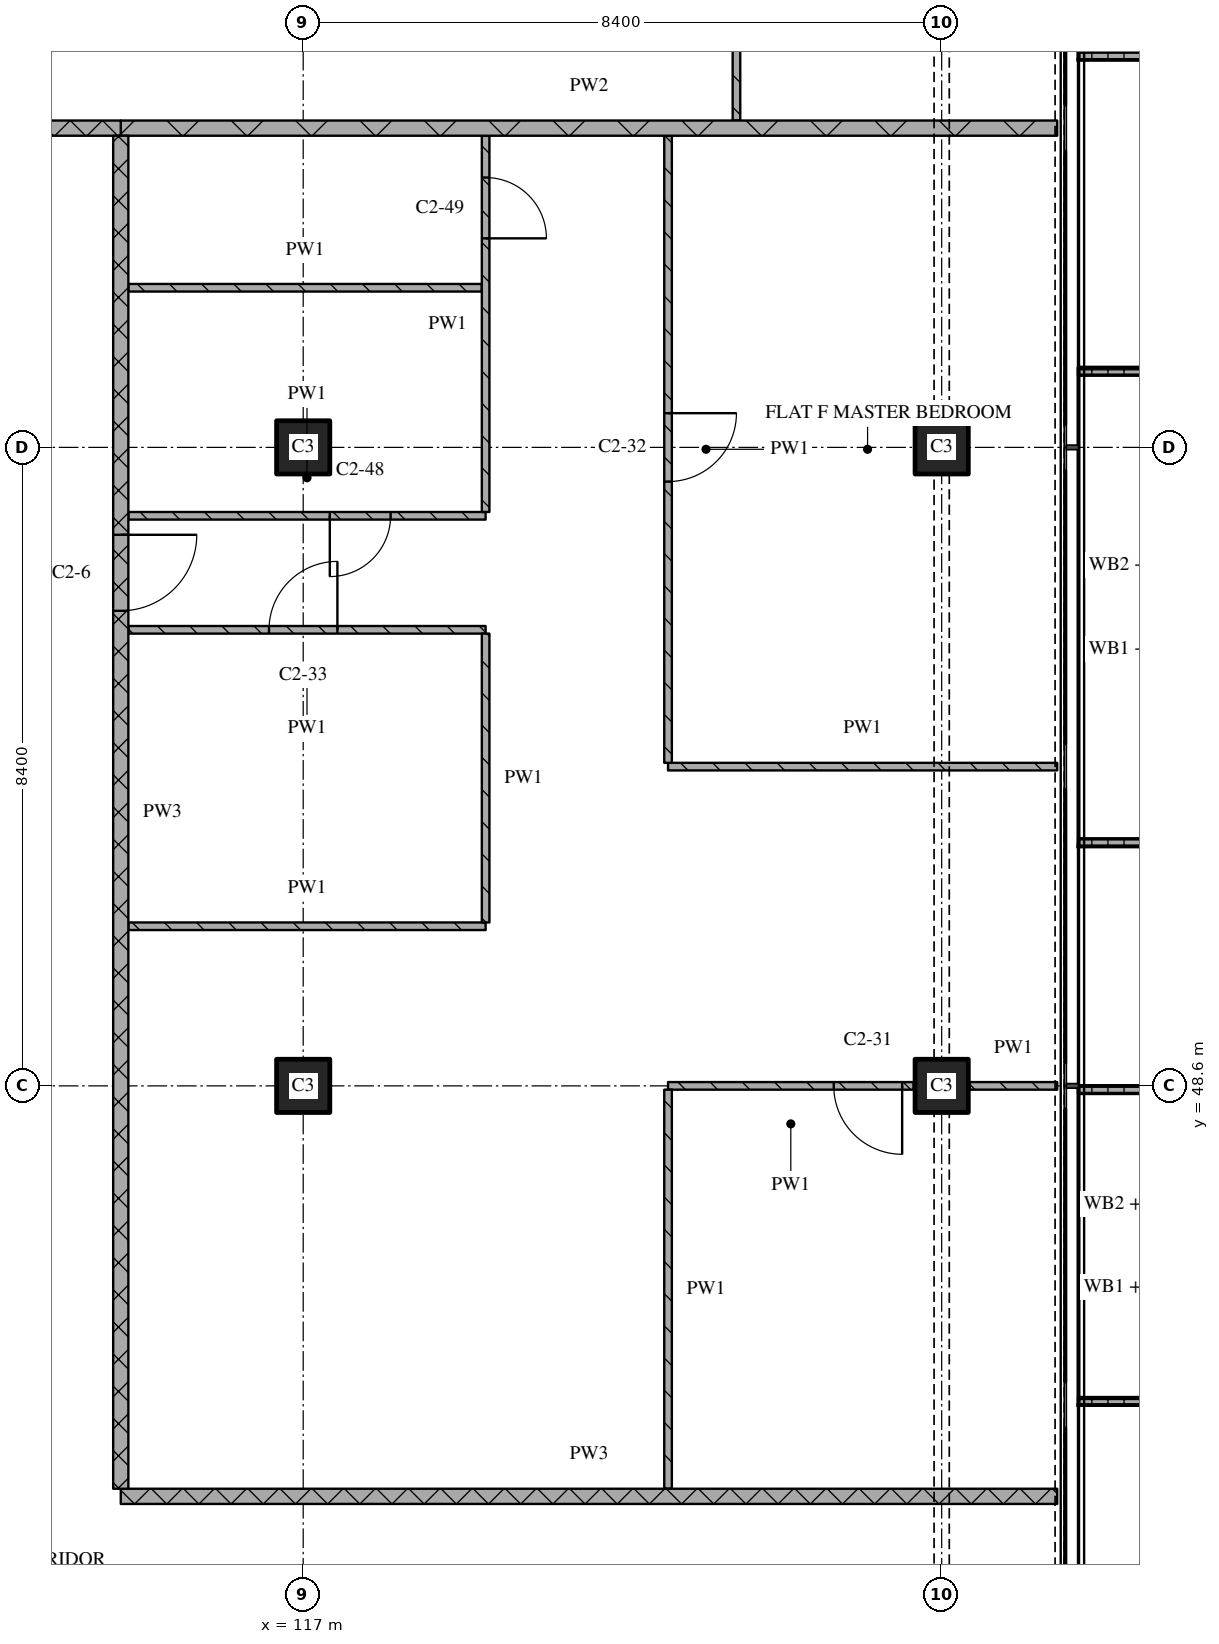
"""IFC4 building model, lengths in metres.
Left out: names, types, materials, properties, quantities, classifications, styles, units other than length and angle.
Written with IfcOpenShell. Run it as: python <this file> out.ifc"""

import sys

from ifc_helpers import new_model, si_unit, direction, frame, frame_2d, origin, origin_2d, place, context, subcontext, project, spatial, polyline, rectangle, outline, extrude, element, fill, save


model = new_model("IFC4")
c1 = context("Model", 3, precision=1e-05, world=origin(), true_north=direction((0.0, 1.0)))
c2 = subcontext(c1, "Body", "Model", "MODEL_VIEW")
j1 = project(units=[si_unit("LENGTHUNIT", "METRE"), si_unit("PLANEANGLEUNIT", "RADIAN")], contexts=[c1])
p1 = place(None, origin())
s1 = spatial("IfcSite", under=j1, at=p1, CompositionType="ELEMENT")
p2 = place(p1, origin())
s2 = spatial("IfcBuilding", under=s1, at=p2, CompositionType="ELEMENT")
p3 = place(p2, frame((0.0, 0.0, 158.25)))
s3 = spatial("IfcBuildingStorey", under=s2, at=p3, CompositionType="ELEMENT", Elevation=158.25)
for number, where, z_axis, x_axis in (
    (1, (117.0, 48.6, 0.0), (0.0, 0.0, 1.0), (1.0, 0.0, 0.0)),
    (2, (117.0, 57.0, 0.0), (0.0, 0.0, 1.0), (1.0, 0.0, 0.0)),
    (3, (125.4, 48.6, 0.0), (0.0, 0.0, 1.0), (1.0, 0.0, 0.0)),
    (4, (125.4, 57.0, 0.0), (0.0, 0.0, 1.0), (1.0, 0.0, 0.0)),
):
    element("IfcColumn", number, at=place(p3, frame(where, z_axis=z_axis, x_axis=x_axis)), inside=s3, PredefinedType="COLUMN", context=c2, shape_type="SweptSolid", body=[
        extrude(rectangle(XDim=0.7, YDim=0.7, at=origin_2d()), origin(), (0.0, 0.0, 1.0), 3.6),
    ])
p4 = place(p3, origin())
e5 = element("IfcWall", 5, at=p4, inside=s3, PredefinedType="SOLIDWALL", context=c2, shape_type="SweptSolid", body=[
    extrude(outline(polyline([(127.2, 44.4), (127.2, 44.5), (128.833, 44.5), (128.833, 48.5), (127.2, 48.5), (127.2, 48.6), (128.933, 48.6), (128.933, 44.4), (127.2, 44.4)])), origin(), (0.0, 0.0, 1.0), 1.0),
])
p5 = place(p3, origin())
e6 = element("IfcWall", 6, at=p5, inside=s3, PredefinedType="SOLIDWALL", context=c2, shape_type="SweptSolid", body=[
    extrude(outline(polyline([(127.2, 51.75), (127.2, 51.85), (128.967, 51.85), (128.967, 57.95), (127.2, 57.95), (127.2, 58.05), (129.067, 58.05), (129.067, 51.75), (127.2, 51.75)])), origin(), (0.0, 0.0, 1.0), 1.0),
])
p6 = place(p3, origin())
e7 = element("IfcWall", 7, at=p6, inside=s3, PredefinedType="SOLIDWALL", context=c2, shape_type="SweptSolid", body=[
    extrude(outline(polyline([(127.2, 62.1), (127.2, 62.2), (128.7, 62.2), (128.7, 64.4), (127.2, 64.4), (127.2, 64.5), (128.8, 64.5), (128.8, 62.1), (127.2, 62.1)])), origin(), (0.0, 0.0, 1.0), 1.0),
])
p7 = place(p3, frame((114.6, 43.2, 0.0), z_axis=(0.0, 0.0, 1.0), x_axis=(1.0, 0.0, 0.0)))
e8 = element("IfcWall", 8, at=p7, inside=s3, PredefinedType="PARTITIONING", context=c2, shape_type="SweptSolid", body=[
    extrude(rectangle(XDim=12.32, YDim=0.2, at=frame_2d((6.16, 0.0))), origin(), (0.0, 0.0, 1.0), 3.32),
])
p8 = place(p3, frame((125.03, 48.6, 0.0), z_axis=(0.0, 0.0, 1.0), x_axis=(-1.0, 0.0, 0.0)))
e9 = element("IfcWall", 9, at=p8, inside=s3, PredefinedType="PARTITIONING", context=c2, shape_type="SweptSolid", body=[
    extrude(rectangle(XDim=3.23, YDim=0.1, at=frame_2d((1.615, 0.0))), origin(), (0.0, 0.0, 1.0), 3.32),
])
p9 = place(p8, frame((0.15, 0.0, 0.0)))
e10 = element("IfcOpeningElement", 10, at=p9, cuts=e9, PredefinedType="OPENING", context=c2, shape_type="SweptSolid", body=[
    extrude(rectangle(XDim=0.9, YDim=2.1, at=frame_2d((0.45, 1.05))), frame((0.0, 0.06, 0.0), z_axis=(0.0, -1.0, 0.0), x_axis=(1.0, 0.0, 0.0)), (0.0, 0.0, 1.0), 0.12),
])
p10 = place(p3, frame((125.77, 48.6, 0.0), z_axis=(0.0, 0.0, 1.0), x_axis=(1.0, 0.0, 0.0)))
e11 = element("IfcWall", 11, at=p10, inside=s3, PredefinedType="PARTITIONING", context=c2, shape_type="SweptSolid", body=[
    extrude(rectangle(XDim=1.15, YDim=0.1, at=frame_2d((0.575, 0.0))), origin(), (0.0, 0.0, 1.0), 3.32),
])
p11 = place(p3, frame((114.7, 50.7, 0.0), z_axis=(0.0, 0.0, 1.0), x_axis=(1.0, 0.0, 0.0)))
e12 = element("IfcWall", 12, at=p11, inside=s3, PredefinedType="PARTITIONING", context=c2, shape_type="SweptSolid", body=[
    extrude(rectangle(XDim=4.7, YDim=0.1, at=frame_2d((2.35, 0.0))), origin(), (0.0, 0.0, 1.0), 3.32),
])
p12 = place(p3, frame((121.8, 52.8, 0.0), z_axis=(0.0, 0.0, 1.0), x_axis=(1.0, 0.0, 0.0)))
e13 = element("IfcWall", 13, at=p12, inside=s3, PredefinedType="PARTITIONING", context=c2, shape_type="SweptSolid", body=[
    extrude(rectangle(XDim=5.12, YDim=0.1, at=frame_2d((2.56, 0.0))), origin(), (0.0, 0.0, 1.0), 3.32),
])
p13 = place(p3, frame((119.4, 54.6, 0.0), z_axis=(0.0, 0.0, 1.0), x_axis=(-1.0, 0.0, 0.0)))
e14 = element("IfcWall", 14, at=p13, inside=s3, PredefinedType="PARTITIONING", context=c2, shape_type="SweptSolid", body=[
    extrude(rectangle(XDim=4.7, YDim=0.1, at=frame_2d((2.35, 0.0))), origin(), (0.0, 0.0, 1.0), 3.32),
])
p14 = place(p13, frame((1.95, 0.0, 0.0)))
e15 = element("IfcOpeningElement", 15, at=p14, cuts=e14, PredefinedType="OPENING", context=c2, shape_type="SweptSolid", body=[
    extrude(rectangle(XDim=0.9, YDim=2.1, at=frame_2d((0.45, 1.05))), frame((0.0, 0.06, 0.0), z_axis=(0.0, -1.0, 0.0), x_axis=(1.0, 0.0, 0.0)), (0.0, 0.0, 1.0), 0.12),
])
p15 = place(p3, frame((114.7, 56.1, 0.0), z_axis=(0.0, 0.0, 1.0), x_axis=(1.0, 0.0, 0.0)))
e16 = element("IfcWall", 16, at=p15, inside=s3, PredefinedType="PARTITIONING", context=c2, shape_type="SweptSolid", body=[
    extrude(rectangle(XDim=4.7, YDim=0.1, at=frame_2d((2.35, 0.0))), origin(), (0.0, 0.0, 1.0), 3.32),
])
p16 = place(p15, frame((2.65, 0.0, 0.0)))
e17 = element("IfcOpeningElement", 17, at=p16, cuts=e16, PredefinedType="OPENING", context=c2, shape_type="SweptSolid", body=[
    extrude(rectangle(XDim=0.8, YDim=2.1, at=frame_2d((0.4, 1.05))), frame((0.0, 0.06, 0.0), z_axis=(0.0, -1.0, 0.0), x_axis=(1.0, 0.0, 0.0)), (0.0, 0.0, 1.0), 0.12),
])
p17 = place(p3, frame((114.7, 59.1, 0.0), z_axis=(0.0, 0.0, 1.0), x_axis=(1.0, 0.0, 0.0)))
e18 = element("IfcWall", 18, at=p17, inside=s3, PredefinedType="PARTITIONING", context=c2, shape_type="SweptSolid", body=[
    extrude(rectangle(XDim=4.65, YDim=0.1, at=frame_2d((2.325, 0.0))), origin(), (0.0, 0.0, 1.0), 3.32),
])
p18 = place(p3, frame((111.0, 61.2, 0.0), z_axis=(0.0, 0.0, 1.0), x_axis=(1.0, 0.0, 0.0)))
e19 = element("IfcWall", 19, at=p18, inside=s3, PredefinedType="PARTITIONING", context=c2, shape_type="SweptSolid", body=[
    extrude(rectangle(XDim=3.6, YDim=0.2, at=frame_2d((1.8, 0.0))), origin(), (0.0, 0.0, 1.0), 3.32),
])
p19 = place(p3, frame((114.6, 61.2, 0.0), z_axis=(0.0, 0.0, 1.0), x_axis=(1.0, 0.0, 0.0)))
e20 = element("IfcWall", 20, at=p19, inside=s3, PredefinedType="PARTITIONING", context=c2, shape_type="SweptSolid", body=[
    extrude(rectangle(XDim=12.32, YDim=0.2, at=frame_2d((6.16, 0.0))), origin(), (0.0, 0.0, 1.0), 3.32),
])
p20 = place(p3, frame((114.6, 61.1, 0.0), z_axis=(0.0, 0.0, 1.0), x_axis=(0.0, -1.0, 0.0)))
e21 = element("IfcWall", 21, at=p20, inside=s3, PredefinedType="PARTITIONING", context=c2, shape_type="SweptSolid", body=[
    extrude(rectangle(XDim=17.8, YDim=0.2, at=frame_2d((8.9, 0.0))), origin(), (0.0, 0.0, 1.0), 3.32),
])
p21 = place(p20, frame((5.25, 0.0, 0.0)))
e22 = element("IfcOpeningElement", 22, at=p21, cuts=e21, PredefinedType="OPENING", context=c2, shape_type="SweptSolid", body=[
    extrude(rectangle(XDim=1.0, YDim=2.1, at=frame_2d((0.5, 1.05))), frame((0.0, 0.11, 0.0), z_axis=(0.0, -1.0, 0.0), x_axis=(1.0, 0.0, 0.0)), (0.0, 0.0, 1.0), 0.22),
])
p22 = place(p3, frame((119.4, 54.55, 0.0), z_axis=(0.0, 0.0, 1.0), x_axis=(0.0, -1.0, 0.0)))
e23 = element("IfcWall", 23, at=p22, inside=s3, PredefinedType="PARTITIONING", context=c2, shape_type="SweptSolid", body=[
    extrude(rectangle(XDim=3.8, YDim=0.1, at=frame_2d((1.9, 0.0))), origin(), (0.0, 0.0, 1.0), 3.32),
])
p23 = place(p3, frame((119.4, 56.15, 0.0), z_axis=(0.0, 0.0, 1.0), x_axis=(0.0, 1.0, 0.0)))
e24 = element("IfcWall", 24, at=p23, inside=s3, PredefinedType="PARTITIONING", context=c2, shape_type="SweptSolid", body=[
    extrude(rectangle(XDim=4.95, YDim=0.1, at=frame_2d((2.475, 0.0))), origin(), (0.0, 0.0, 1.0), 3.32),
])
p24 = place(p23, frame((3.6, 0.0, 0.0)))
e25 = element("IfcOpeningElement", 25, at=p24, cuts=e24, PredefinedType="OPENING", context=c2, shape_type="SweptSolid", body=[
    extrude(rectangle(XDim=0.8, YDim=2.1, at=frame_2d((0.4, 1.05))), frame((0.0, 0.06, 0.0), z_axis=(0.0, -1.0, 0.0), x_axis=(1.0, 0.0, 0.0)), (0.0, 0.0, 1.0), 0.12),
])
p25 = place(p3, frame((121.8, 48.55, 0.0), z_axis=(0.0, 0.0, 1.0), x_axis=(0.0, -1.0, 0.0)))
e26 = element("IfcWall", 26, at=p25, inside=s3, PredefinedType="PARTITIONING", context=c2, shape_type="SweptSolid", body=[
    extrude(rectangle(XDim=5.25, YDim=0.1, at=frame_2d((2.625, 0.0))), origin(), (0.0, 0.0, 1.0), 3.32),
])
p26 = place(p3, frame((121.8, 61.1, 0.0), z_axis=(0.0, 0.0, 1.0), x_axis=(0.0, -1.0, 0.0)))
e27 = element("IfcWall", 27, at=p26, inside=s3, PredefinedType="PARTITIONING", context=c2, shape_type="SweptSolid", body=[
    extrude(rectangle(XDim=8.25, YDim=0.1, at=frame_2d((4.125, 0.0))), origin(), (0.0, 0.0, 1.0), 3.32),
])
p27 = place(p26, frame((3.65, 0.0, 0.0)))
e28 = element("IfcOpeningElement", 28, at=p27, cuts=e27, PredefinedType="OPENING", context=c2, shape_type="SweptSolid", body=[
    extrude(rectangle(XDim=0.9, YDim=2.1, at=frame_2d((0.45, 1.05))), frame((0.0, 0.06, 0.0), z_axis=(0.0, -1.0, 0.0), x_axis=(1.0, 0.0, 0.0)), (0.0, 0.0, 1.0), 0.12),
])
p28 = place(p3, frame((122.7, 65.35, 0.0), z_axis=(0.0, 0.0, 1.0), x_axis=(0.0, -1.0, 0.0)))
e29 = element("IfcWall", 29, at=p28, inside=s3, PredefinedType="PARTITIONING", context=c2, shape_type="SweptSolid", body=[
    extrude(rectangle(XDim=4.05, YDim=0.1, at=frame_2d((2.025, 0.0))), origin(), (0.0, 0.0, 1.0), 3.32),
])
p29 = place(p9, origin())
e30 = element("IfcDoor", 30, at=p29, inside=s3, OperationType="SINGLE_SWING_LEFT", PredefinedType="DOOR", context=c2, shape_type="SweptSolid", body=[
    extrude(rectangle(XDim=0.9, YDim=2.1, at=frame_2d((0.45, 1.05))), frame((0.0, 0.025, 0.0), z_axis=(0.0, -1.0, 0.0), x_axis=(1.0, 0.0, 0.0)), (0.0, 0.0, 1.0), 0.05),
])
fill(e10, e30)
p30 = place(p14, origin())
e31 = element("IfcDoor", 31, at=p30, inside=s3, OperationType="SINGLE_SWING_RIGHT", PredefinedType="DOOR", context=c2, shape_type="SweptSolid", body=[
    extrude(rectangle(XDim=0.9, YDim=2.1, at=frame_2d((0.45, 1.05))), frame((0.0, 0.025, 0.0), z_axis=(0.0, -1.0, 0.0), x_axis=(1.0, 0.0, 0.0)), (0.0, 0.0, 1.0), 0.05),
])
fill(e15, e31)
p31 = place(p16, origin())
e32 = element("IfcDoor", 32, at=p31, inside=s3, OperationType="SINGLE_SWING_RIGHT", PredefinedType="DOOR", context=c2, shape_type="SweptSolid", body=[
    extrude(rectangle(XDim=0.8, YDim=2.1, at=frame_2d((0.4, 1.05))), frame((0.0, 0.025, 0.0), z_axis=(0.0, -1.0, 0.0), x_axis=(1.0, 0.0, 0.0)), (0.0, 0.0, 1.0), 0.05),
])
fill(e17, e32)
p32 = place(p21, origin())
e33 = element("IfcDoor", 33, at=p32, inside=s3, OperationType="SINGLE_SWING_LEFT", PredefinedType="DOOR", context=c2, shape_type="SweptSolid", body=[
    extrude(rectangle(XDim=1.0, YDim=2.1, at=frame_2d((0.5, 1.05))), frame((0.0, 0.025, 0.0), z_axis=(0.0, -1.0, 0.0), x_axis=(1.0, 0.0, 0.0)), (0.0, 0.0, 1.0), 0.05),
])
fill(e22, e33)
p33 = place(p24, origin())
e34 = element("IfcDoor", 34, at=p33, inside=s3, OperationType="SINGLE_SWING_RIGHT", PredefinedType="DOOR", context=c2, shape_type="SweptSolid", body=[
    extrude(rectangle(XDim=0.8, YDim=2.1, at=frame_2d((0.4, 1.05))), frame((0.0, 0.025, 0.0), z_axis=(0.0, -1.0, 0.0), x_axis=(1.0, 0.0, 0.0)), (0.0, 0.0, 1.0), 0.05),
])
fill(e25, e34)
p34 = place(p27, origin())
e35 = element("IfcDoor", 35, at=p34, inside=s3, OperationType="SINGLE_SWING_LEFT", PredefinedType="DOOR", context=c2, shape_type="SweptSolid", body=[
    extrude(rectangle(XDim=0.9, YDim=2.1, at=frame_2d((0.45, 1.05))), frame((0.0, 0.025, 0.0), z_axis=(0.0, -1.0, 0.0), x_axis=(1.0, 0.0, 0.0)), (0.0, 0.0, 1.0), 0.05),
])
fill(e28, e35)
save(model, sys.argv[1])
